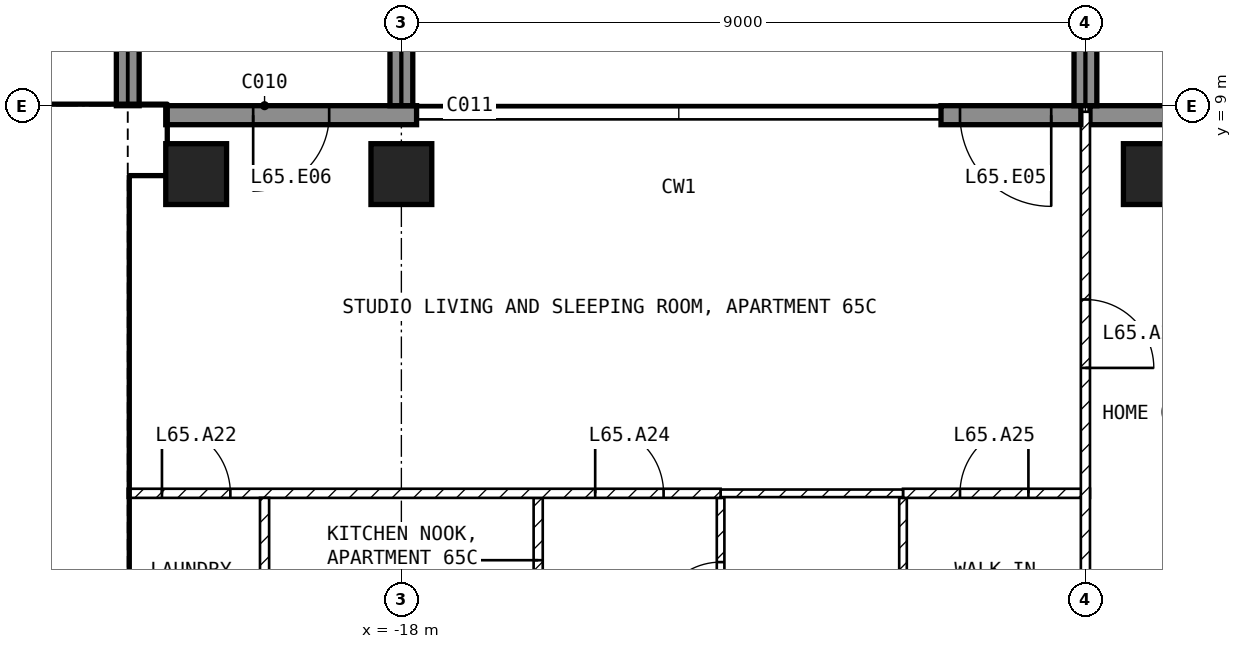
"""IFC4 building model, lengths in metres.
Left out: names, types, materials, properties, quantities, classifications, styles, units other than length and angle.
Written with IfcOpenShell. Run it as: python <this file> out.ifc"""

import sys

from ifc_helpers import new_model, si_unit, direction, frame, frame_2d, origin, origin_2d, place, context, subcontext, project, spatial, rectangle, extrude, element, fill, save


model = new_model("IFC4")
c1 = context("Model", 3, precision=1e-05, world=origin(), true_north=direction((0.0, 1.0)))
c2 = subcontext(c1, "Body", "Model", "MODEL_VIEW")
j1 = project(units=[si_unit("LENGTHUNIT", "METRE"), si_unit("PLANEANGLEUNIT", "RADIAN")], contexts=[c1])
p1 = place(None, origin())
s1 = spatial("IfcSite", under=j1, at=p1, CompositionType="ELEMENT")
p2 = place(p1, origin())
s2 = spatial("IfcBuilding", under=s1, at=p2, CompositionType="ELEMENT")
p3 = place(p2, frame((0.0, 0.0, 257.0)))
s3 = spatial("IfcBuildingStorey", under=s2, at=p3, CompositionType="ELEMENT", Elevation=257.0)
for number, where, z_axis, x_axis in (
    (1, (-20.7, 8.1, -0.25), (0.0, 0.0, 1.0), (1.0, 0.0, 0.0)),
    (2, (-18.0, 8.1, -0.25), (0.0, 0.0, 1.0), (1.0, 0.0, 0.0)),
    (3, (-8.1, 8.1, -0.25), (0.0, 0.0, 1.0), (1.0, 0.0, 0.0)),
):
    element("IfcColumn", number, at=place(p3, frame(where, z_axis=z_axis, x_axis=x_axis)), inside=s3, PredefinedType="COLUMN", context=c2, shape_type="SweptSolid", body=[
        extrude(rectangle(XDim=0.8, YDim=0.8, at=origin_2d()), origin(), (0.0, 0.0, 1.0), 3.5),
    ])
p4 = place(p3, frame((-5.9, 8.875, 0.0), z_axis=(0.0, 0.0, 1.0), x_axis=(-1.0, 0.0, 0.0)))
e4 = element("IfcWall", 4, at=p4, inside=s3, PredefinedType="SOLIDWALL", context=c2, shape_type="SweptSolid", body=[
    extrude(rectangle(XDim=3.04, YDim=0.25, at=frame_2d((1.52, 0.0))), origin(), (0.0, 0.0, 1.0), 3.25),
])
p5 = place(p4, frame((0.25, 0.0, 0.0)))
e5 = element("IfcOpeningElement", 5, at=p5, cuts=e4, PredefinedType="OPENING", context=c2, shape_type="SweptSolid", body=[
    extrude(rectangle(XDim=1.2, YDim=2.4, at=frame_2d((0.6, 1.2))), frame((0.0, 0.135, 0.0), z_axis=(0.0, -1.0, 0.0), x_axis=(1.0, 0.0, 0.0)), (0.0, 0.0, 1.0), 0.27),
])
p6 = place(p3, frame((-9.06, 8.875, 0.0), z_axis=(0.0, 0.0, 1.0), x_axis=(-1.0, 0.0, 0.0)))
e6 = element("IfcWall", 6, at=p6, inside=s3, PredefinedType="SOLIDWALL", context=c2, shape_type="SweptSolid", body=[
    extrude(rectangle(XDim=1.84, YDim=0.25, at=frame_2d((0.92, 0.0))), origin(), (0.0, 0.0, 1.0), 3.25),
])
p7 = place(p6, frame((0.39, 0.0, 0.0)))
e7 = element("IfcOpeningElement", 7, at=p7, cuts=e6, PredefinedType="OPENING", context=c2, shape_type="SweptSolid", body=[
    extrude(rectangle(XDim=1.2, YDim=2.4, at=frame_2d((0.6, 1.2))), frame((0.0, 0.135, 0.0), z_axis=(0.0, -1.0, 0.0), x_axis=(1.0, 0.0, 0.0)), (0.0, 0.0, 1.0), 0.27),
])
p8 = place(p3, frame((-17.8, 8.875, 0.0), z_axis=(0.0, 0.0, 1.0), x_axis=(-1.0, 0.0, 0.0)))
e8 = element("IfcWall", 8, at=p8, inside=s3, PredefinedType="SOLIDWALL", context=c2, shape_type="SweptSolid", body=[
    extrude(rectangle(XDim=3.3, YDim=0.25, at=frame_2d((1.65, 0.0))), origin(), (0.0, 0.0, 1.0), 3.25),
])
p9 = place(p8, frame((1.15, 0.0, 0.0)))
e9 = element("IfcOpeningElement", 9, at=p9, cuts=e8, PredefinedType="OPENING", context=c2, shape_type="SweptSolid", body=[
    extrude(rectangle(XDim=1.0, YDim=2.4, at=frame_2d((0.5, 1.2))), frame((0.0, 0.135, 0.0), z_axis=(0.0, -1.0, 0.0), x_axis=(1.0, 0.0, 0.0)), (0.0, 0.0, 1.0), 0.27),
])
for number, where, z_axis, x_axis in (
    (10, (-21.6, 9.0, 0.0), (0.0, 0.0, 1.0), (0.0, 1.0, 0.0)),
    (11, (-18.0, 9.0, 0.0), (0.0, 0.0, 1.0), (0.0, 1.0, 0.0)),
    (12, (-9.0, 9.0, 0.0), (0.0, 0.0, 1.0), (0.0, 1.0, 0.0)),
):
    element("IfcWall", number, at=place(p3, frame(where, z_axis=z_axis, x_axis=x_axis)), inside=s3, PredefinedType="SOLIDWALL", context=c2, shape_type="SweptSolid", body=[
        extrude(rectangle(XDim=2.7, YDim=0.3, at=frame_2d((1.35, 0.0))), origin(), (0.0, 0.0, 1.0), 3.25),
    ])
p10 = place(p3, frame((-29.75, 8.55, 0.0), z_axis=(0.0, 0.0, 1.0), x_axis=(1.0, 0.0, 0.0)))
e13 = element("IfcWall", 13, at=p10, inside=s3, PredefinedType="SHEAR", context=c2, shape_type="SweptSolid", body=[
    extrude(rectangle(XDim=8.65, YDim=0.9, at=frame_2d((4.325, 0.0))), origin(), (0.0, 0.0, 1.0), 3.25),
])
p11 = place(p3, frame((-21.825, 1.2, 0.0), z_axis=(0.0, 0.0, 1.0), x_axis=(0.0, 1.0, 0.0)))
e14 = element("IfcWall", 14, at=p11, inside=s3, PredefinedType="SHEAR", context=c2, shape_type="SweptSolid", body=[
    extrude(rectangle(XDim=6.9, YDim=0.45, at=frame_2d((3.45, 0.0))), origin(), (0.0, 0.0, 1.0), 3.25),
])
p12 = place(p3, frame((-28.35, 5.15, 0.0), z_axis=(0.0, 0.0, 1.0), x_axis=(1.0, 0.0, 0.0)))
e15 = element("IfcWall", 15, at=p12, inside=s3, PredefinedType="SOLIDWALL", context=c2, shape_type="SweptSolid", body=[
    extrude(rectangle(XDim=6.3, YDim=0.2, at=frame_2d((3.15, 0.0))), origin(), (0.0, 0.0, 1.0), 3.25),
])
p13 = place(p12, frame((5.1, 0.0, 0.0)))
e16 = element("IfcOpeningElement", 16, at=p13, cuts=e15, PredefinedType="OPENING", context=c2, shape_type="SweptSolid", body=[
    extrude(rectangle(XDim=1.0, YDim=2.1, at=frame_2d((0.5, 1.05))), frame((0.0, 0.11, 0.0), z_axis=(0.0, -1.0, 0.0), x_axis=(1.0, 0.0, 0.0)), (0.0, 0.0, 1.0), 0.22),
])
p14 = place(p3, frame((-11.4, 1.3, 0.0), z_axis=(0.0, 0.0, 1.0), x_axis=(0.0, 1.0, 0.0)))
e17 = element("IfcWall", 17, at=p14, inside=s3, PredefinedType="PARTITIONING", context=c2, shape_type="SweptSolid", body=[
    extrude(rectangle(XDim=2.54, YDim=0.1, at=frame_2d((1.27, 0.0))), origin(), (0.0, 0.0, 1.0), 3.25),
])
p15 = place(p3, frame((-11.4, 3.9, 0.0), z_axis=(0.0, 0.0, 1.0), x_axis=(1.0, 0.0, 0.0)))
e18 = element("IfcWall", 18, at=p15, inside=s3, PredefinedType="PARTITIONING", context=c2, shape_type="SweptSolid", body=[
    extrude(rectangle(XDim=2.46, YDim=0.12, at=frame_2d((1.23, 0.0))), origin(), (0.0, 0.0, 1.0), 3.25),
])
p16 = place(p15, frame((0.75, 0.0, 0.0)))
e19 = element("IfcOpeningElement", 19, at=p16, cuts=e18, PredefinedType="OPENING", context=c2, shape_type="SweptSolid", body=[
    extrude(rectangle(XDim=0.9, YDim=2.1, at=frame_2d((0.45, 1.05))), frame((0.0, 0.07, 0.0), z_axis=(0.0, -1.0, 0.0), x_axis=(1.0, 0.0, 0.0)), (0.0, 0.0, 1.0), 0.14),
])
p17 = place(p3, frame((-9.0, 8.92, 0.0), z_axis=(0.0, 0.0, 1.0), x_axis=(0.0, -1.0, 0.0)))
e20 = element("IfcWall", 20, at=p17, inside=s3, PredefinedType="PARTITIONING", context=c2, shape_type="SweptSolid", body=[
    extrude(rectangle(XDim=7.62, YDim=0.12, at=frame_2d((3.81, 0.0))), origin(), (0.0, 0.0, 1.0), 3.25),
])
p18 = place(p17, frame((2.47, 0.0, 0.0)))
e21 = element("IfcOpeningElement", 21, at=p18, cuts=e20, PredefinedType="OPENING", context=c2, shape_type="SweptSolid", body=[
    extrude(rectangle(XDim=0.9, YDim=2.1, at=frame_2d((0.45, 1.05))), frame((0.0, 0.07, 0.0), z_axis=(0.0, -1.0, 0.0), x_axis=(1.0, 0.0, 0.0)), (0.0, 0.0, 1.0), 0.14),
])
p19 = place(p3, frame((-13.8, 1.3, 0.0), z_axis=(0.0, 0.0, 1.0), x_axis=(0.0, 1.0, 0.0)))
e22 = element("IfcWall", 22, at=p19, inside=s3, PredefinedType="PARTITIONING", context=c2, shape_type="SweptSolid", body=[
    extrude(rectangle(XDim=2.54, YDim=0.1, at=frame_2d((1.27, 0.0))), origin(), (0.0, 0.0, 1.0), 3.25),
])
p20 = place(p19, frame((0.845, 0.0, 0.0)))
e23 = element("IfcOpeningElement", 23, at=p20, cuts=e22, PredefinedType="OPENING", context=c2, shape_type="SweptSolid", body=[
    extrude(rectangle(XDim=0.85, YDim=2.1, at=frame_2d((0.425, 1.05))), frame((0.0, 0.06, 0.0), z_axis=(0.0, -1.0, 0.0), x_axis=(1.0, 0.0, 0.0)), (0.0, 0.0, 1.0), 0.12),
])
p21 = place(p3, frame((-13.8, 3.9, 0.0), z_axis=(0.0, 0.0, 1.0), x_axis=(1.0, 0.0, 0.0)))
e24 = element("IfcWall", 24, at=p21, inside=s3, PredefinedType="PARTITIONING", context=c2, shape_type="SweptSolid", body=[
    extrude(rectangle(XDim=2.4, YDim=0.1, at=frame_2d((1.2, 0.0))), origin(), (0.0, 0.0, 1.0), 3.25),
])
p22 = place(p3, frame((-16.2, 1.3, 0.0), z_axis=(0.0, 0.0, 1.0), x_axis=(0.0, 1.0, 0.0)))
e25 = element("IfcWall", 25, at=p22, inside=s3, PredefinedType="PARTITIONING", context=c2, shape_type="SweptSolid", body=[
    extrude(rectangle(XDim=2.54, YDim=0.12, at=frame_2d((1.27, 0.0))), origin(), (0.0, 0.0, 1.0), 3.25),
])
p23 = place(p22, frame((0.82, 0.0, 0.0)))
e26 = element("IfcOpeningElement", 26, at=p23, cuts=e25, PredefinedType="OPENING", context=c2, shape_type="SweptSolid", body=[
    extrude(rectangle(XDim=0.9, YDim=2.1, at=frame_2d((0.45, 1.05))), frame((0.0, 0.07, 0.0), z_axis=(0.0, -1.0, 0.0), x_axis=(1.0, 0.0, 0.0)), (0.0, 0.0, 1.0), 0.14),
])
p24 = place(p3, frame((-21.6, 3.9, 0.0), z_axis=(0.0, 0.0, 1.0), x_axis=(1.0, 0.0, 0.0)))
e27 = element("IfcWall", 27, at=p24, inside=s3, PredefinedType="PARTITIONING", context=c2, shape_type="SweptSolid", body=[
    extrude(rectangle(XDim=7.8, YDim=0.12, at=frame_2d((3.9, 0.0))), origin(), (0.0, 0.0, 1.0), 3.25),
])
p25 = place(p24, frame((0.45, 0.0, 0.0)))
e28 = element("IfcOpeningElement", 28, at=p25, cuts=e27, PredefinedType="OPENING", context=c2, shape_type="SweptSolid", body=[
    extrude(rectangle(XDim=0.9, YDim=2.1, at=frame_2d((0.45, 1.05))), frame((0.0, 0.07, 0.0), z_axis=(0.0, -1.0, 0.0), x_axis=(1.0, 0.0, 0.0)), (0.0, 0.0, 1.0), 0.14),
])
p26 = place(p24, frame((6.15, 0.0, 0.0)))
e29 = element("IfcOpeningElement", 29, at=p26, cuts=e27, PredefinedType="OPENING", context=c2, shape_type="SweptSolid", body=[
    extrude(rectangle(XDim=0.9, YDim=2.1, at=frame_2d((0.45, 1.05))), frame((0.0, 0.07, 0.0), z_axis=(0.0, -1.0, 0.0), x_axis=(1.0, 0.0, 0.0)), (0.0, 0.0, 1.0), 0.14),
])
p27 = place(p3, frame((-19.8, 1.3, 0.0), z_axis=(0.0, 0.0, 1.0), x_axis=(0.0, 1.0, 0.0)))
e30 = element("IfcWall", 30, at=p27, inside=s3, PredefinedType="PARTITIONING", context=c2, shape_type="SweptSolid", body=[
    extrude(rectangle(XDim=2.54, YDim=0.12, at=frame_2d((1.27, 0.0))), origin(), (0.0, 0.0, 1.0), 3.25),
])
p28 = place(p7, origin())
e31 = element("IfcDoor", 31, at=p28, inside=s3, OperationType="SINGLE_SWING_LEFT", PredefinedType="DOOR", context=c2, shape_type="SweptSolid", body=[
    extrude(rectangle(XDim=1.2, YDim=2.4, at=frame_2d((0.6, 1.2))), frame((0.0, 0.025, 0.0), z_axis=(0.0, -1.0, 0.0), x_axis=(1.0, 0.0, 0.0)), (0.0, 0.0, 1.0), 0.05),
])
fill(e7, e31)
p29 = place(p9, origin())
e32 = element("IfcDoor", 32, at=p29, inside=s3, OperationType="SINGLE_SWING_RIGHT", PredefinedType="DOOR", context=c2, shape_type="SweptSolid", body=[
    extrude(rectangle(XDim=1.0, YDim=2.4, at=frame_2d((0.5, 1.2))), frame((0.0, 0.025, 0.0), z_axis=(0.0, -1.0, 0.0), x_axis=(1.0, 0.0, 0.0)), (0.0, 0.0, 1.0), 0.05),
])
fill(e9, e32)
p30 = place(p13, origin())
e33 = element("IfcDoor", 33, at=p30, inside=s3, OperationType="SINGLE_SWING_LEFT", PredefinedType="DOOR", context=c2, shape_type="SweptSolid", body=[
    extrude(rectangle(XDim=1.0, YDim=2.1, at=frame_2d((0.5, 1.05))), frame((0.0, 0.025, 0.0), z_axis=(0.0, -1.0, 0.0), x_axis=(1.0, 0.0, 0.0)), (0.0, 0.0, 1.0), 0.05),
])
fill(e16, e33)
p31 = place(p20, origin())
e34 = element("IfcDoor", 34, at=p31, inside=s3, OperationType="SINGLE_SWING_LEFT", PredefinedType="DOOR", context=c2, shape_type="SweptSolid", body=[
    extrude(rectangle(XDim=0.85, YDim=2.1, at=frame_2d((0.425, 1.05))), frame((0.0, 0.025, 0.0), z_axis=(0.0, -1.0, 0.0), x_axis=(1.0, 0.0, 0.0)), (0.0, 0.0, 1.0), 0.05),
])
fill(e23, e34)
p32 = place(p18, origin())
e35 = element("IfcDoor", 35, at=p32, inside=s3, OperationType="SINGLE_SWING_RIGHT", PredefinedType="DOOR", context=c2, shape_type="SweptSolid", body=[
    extrude(rectangle(XDim=0.9, YDim=2.1, at=frame_2d((0.45, 1.05))), frame((0.0, 0.025, 0.0), z_axis=(0.0, -1.0, 0.0), x_axis=(1.0, 0.0, 0.0)), (0.0, 0.0, 1.0), 0.05),
])
fill(e21, e35)
p33 = place(p23, origin())
e36 = element("IfcDoor", 36, at=p33, inside=s3, OperationType="SINGLE_SWING_RIGHT", PredefinedType="DOOR", context=c2, shape_type="SweptSolid", body=[
    extrude(rectangle(XDim=0.9, YDim=2.1, at=frame_2d((0.45, 1.05))), frame((0.0, 0.025, 0.0), z_axis=(0.0, -1.0, 0.0), x_axis=(1.0, 0.0, 0.0)), (0.0, 0.0, 1.0), 0.05),
])
fill(e26, e36)
p34 = place(p25, origin())
e37 = element("IfcDoor", 37, at=p34, inside=s3, OperationType="SINGLE_SWING_LEFT", PredefinedType="DOOR", context=c2, shape_type="SweptSolid", body=[
    extrude(rectangle(XDim=0.9, YDim=2.1, at=frame_2d((0.45, 1.05))), frame((0.0, 0.025, 0.0), z_axis=(0.0, -1.0, 0.0), x_axis=(1.0, 0.0, 0.0)), (0.0, 0.0, 1.0), 0.05),
])
fill(e28, e37)
p35 = place(p26, origin())
e38 = element("IfcDoor", 38, at=p35, inside=s3, OperationType="SINGLE_SWING_LEFT", PredefinedType="DOOR", context=c2, shape_type="SweptSolid", body=[
    extrude(rectangle(XDim=0.9, YDim=2.1, at=frame_2d((0.45, 1.05))), frame((0.0, 0.025, 0.0), z_axis=(0.0, -1.0, 0.0), x_axis=(1.0, 0.0, 0.0)), (0.0, 0.0, 1.0), 0.05),
])
fill(e29, e38)
p36 = place(p16, origin())
e39 = element("IfcDoor", 39, at=p36, inside=s3, OperationType="SINGLE_SWING_RIGHT", PredefinedType="DOOR", context=c2, shape_type="SweptSolid", body=[
    extrude(rectangle(XDim=0.9, YDim=2.1, at=frame_2d((0.45, 1.05))), frame((0.0, 0.025, 0.0), z_axis=(0.0, -1.0, 0.0), x_axis=(1.0, 0.0, 0.0)), (0.0, 0.0, 1.0), 0.05),
])
fill(e19, e39)
save(model, sys.argv[1])
